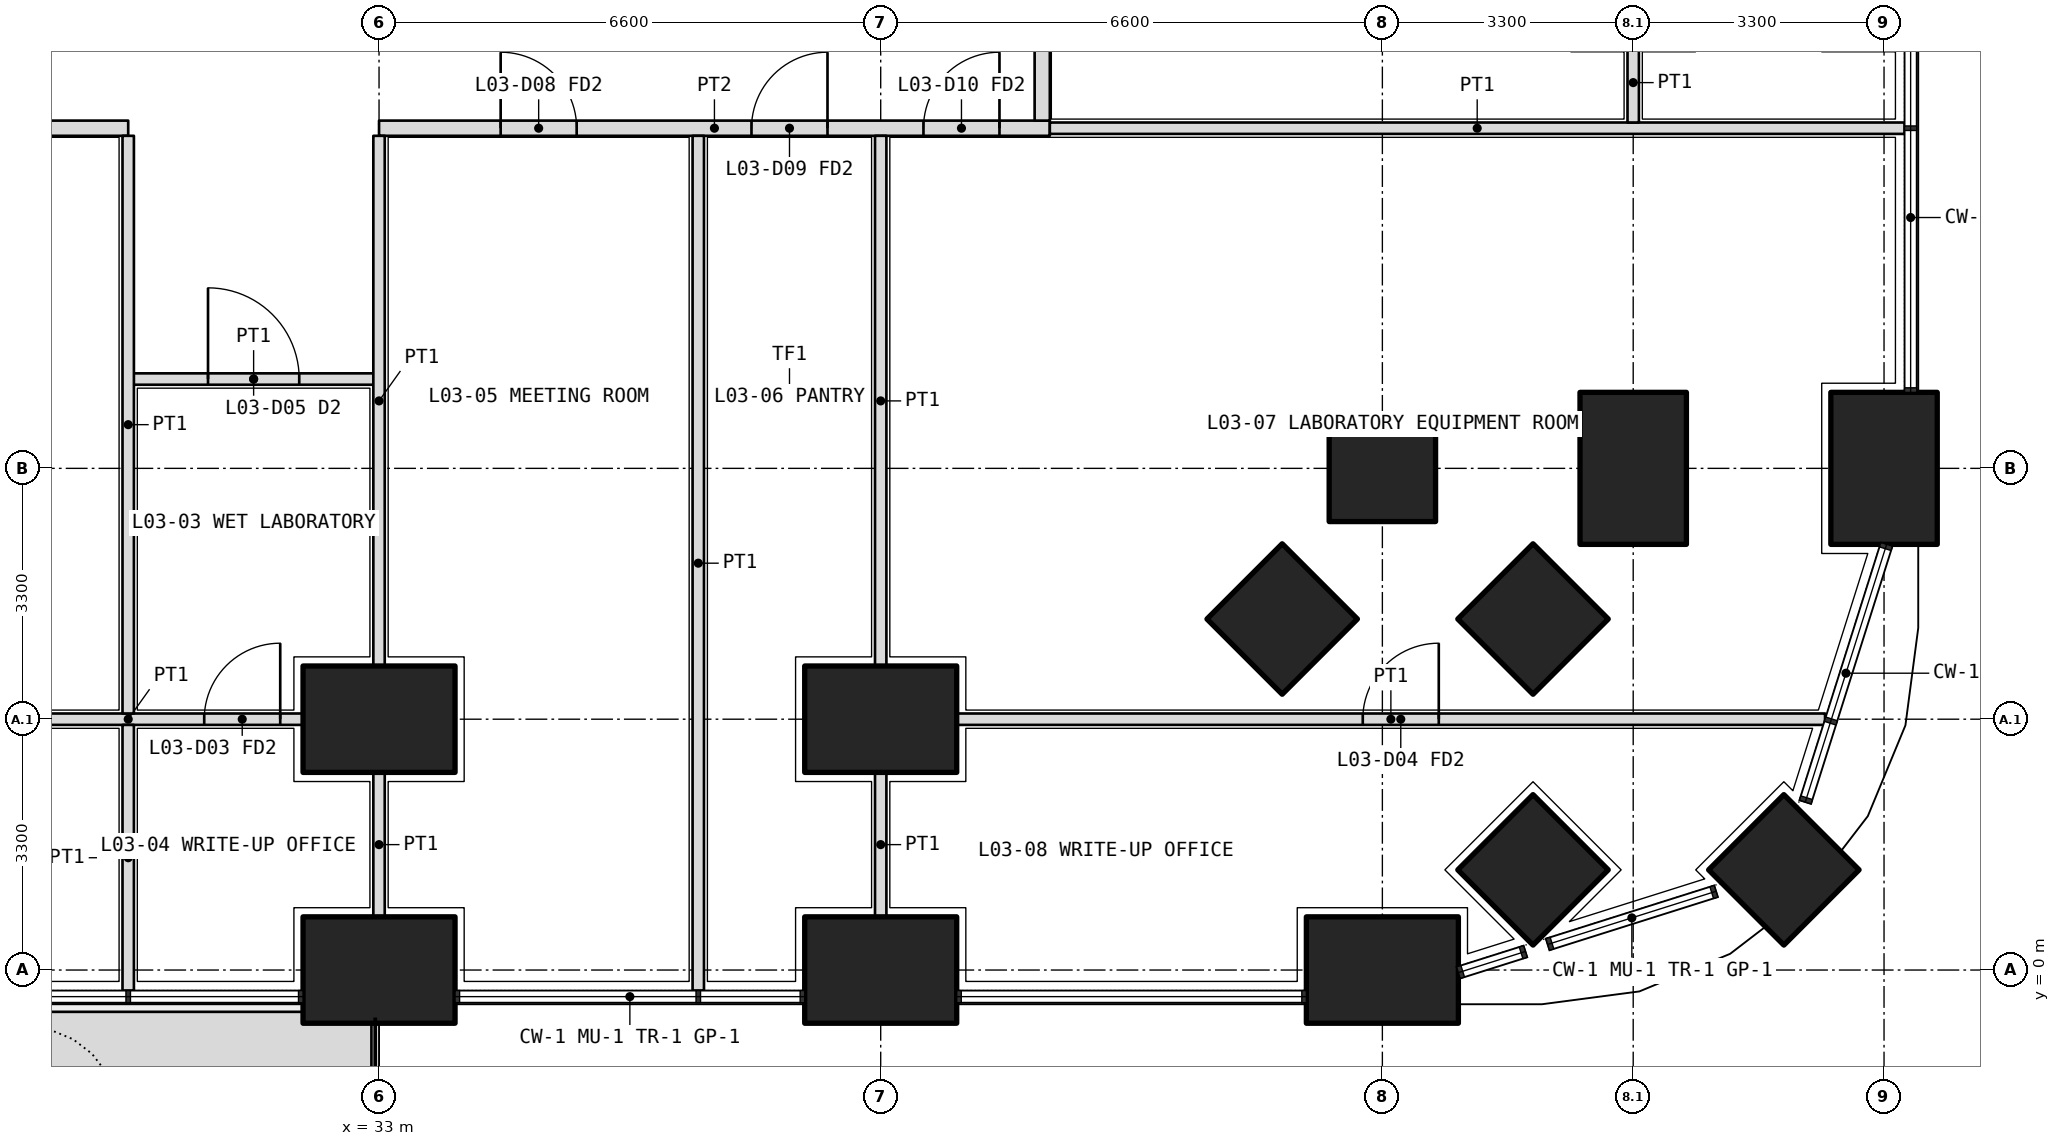
"""IFC4 building model, lengths in metres.
Left out: names, types, materials, properties, quantities, classifications, styles, units other than length and angle.
Written with IfcOpenShell. Run it as: python <this file> out.ifc"""

import sys

from ifc_helpers import new_model, si_unit, direction, frame, frame_2d, origin, origin_2d, place, context, subcontext, project, spatial, polyline, rectangle, outline, extrude, element, fill, save


model = new_model("IFC4")
c1 = context("Model", 3, precision=1e-05, world=origin(), true_north=direction((0.0, 1.0)))
c2 = subcontext(c1, "Body", "Model", "MODEL_VIEW")
j1 = project(units=[si_unit("LENGTHUNIT", "METRE"), si_unit("PLANEANGLEUNIT", "RADIAN")], contexts=[c1])
p1 = place(None, origin())
s1 = spatial("IfcSite", under=j1, at=p1, CompositionType="ELEMENT")
p2 = place(p1, origin())
s2 = spatial("IfcBuilding", under=s1, at=p2, CompositionType="ELEMENT")
p3 = place(p2, frame((0.0, 0.0, 17.1)))
s3 = spatial("IfcBuildingStorey", under=s2, at=p3, CompositionType="ELEMENT", Elevation=17.1)
p4 = place(p3, frame((51.482, 1.318, 0.0), z_axis=(0.0, 0.0, 1.0), x_axis=(0.707106781187, 0.707106781187, 0.0)))
e1 = element("IfcColumn", 1, at=p4, inside=s3, PredefinedType="COLUMN", context=c2, shape_type="SweptSolid", body=[
    extrude(rectangle(XDim=1.4, YDim=1.4, at=origin_2d()), origin(), (0.0, 0.0, 1.0), 4.2),
])
for number, where, z_axis, x_axis in (
    (2, (33.0, 0.0, 0.0), (0.0, 0.0, 1.0), (1.0, 0.0, 0.0)),
    (3, (39.6, 0.0, 0.0), (0.0, 0.0, 1.0), (1.0, 0.0, 0.0)),
    (4, (46.2, 0.0, 0.0), (0.0, 0.0, 1.0), (1.0, 0.0, 0.0)),
    (5, (52.8, 6.6, 0.0), (0.0, 0.0, 1.0), (0.0, 1.0, 0.0)),
):
    element("IfcColumn", number, at=place(p3, frame(where, z_axis=z_axis, x_axis=x_axis)), inside=s3, PredefinedType="COLUMN", context=c2, shape_type="SweptSolid", body=[
        extrude(rectangle(XDim=2.0, YDim=1.4, at=origin_2d()), origin(), (0.0, 0.0, 1.0), 4.2),
    ])
for number, where, z_axis, x_axis in (
    (6, (46.2, 6.6, 0.0), (0.0, 0.0, 1.0), (1.0, 0.0, 0.0)),
    (7, (48.182, 1.318, 0.0), (0.0, 0.0, 1.0), (0.707, 0.707, 0.0)),
):
    element("IfcColumn", number, at=place(p3, frame(where, z_axis=z_axis, x_axis=x_axis)), inside=s3, PredefinedType="COLUMN", context=c2, shape_type="SweptSolid", body=[
        extrude(rectangle(XDim=1.4, YDim=1.4, at=origin_2d()), origin(), (0.0, 0.0, 1.0), 4.2),
    ])
p5 = place(p3, frame((49.5, 6.6, 0.0), z_axis=(0.0, 0.0, 1.0), x_axis=(0.0, 1.0, 0.0)))
e8 = element("IfcColumn", 8, at=p5, inside=s3, PredefinedType="COLUMN", context=c2, shape_type="SweptSolid", body=[
    extrude(rectangle(XDim=2.0, YDim=1.4, at=origin_2d()), origin(), (0.0, 0.0, 1.0), 4.2),
])
p6 = place(p3, frame((48.182, 4.618, 0.0), z_axis=(0.0, 0.0, 1.0), x_axis=(0.707106781187, 0.707106781187, 0.0)))
e9 = element("IfcColumn", 9, at=p6, inside=s3, PredefinedType="COLUMN", context=c2, shape_type="SweptSolid", body=[
    extrude(rectangle(XDim=1.4, YDim=1.4, at=origin_2d()), origin(), (0.0, 0.0, 1.0), 4.2),
])
for number, where, z_axis, x_axis in (
    (10, (33.0, 3.3, 0.0), (0.0, 0.0, 1.0), (1.0, 0.0, 0.0)),
    (11, (39.6, 3.3, 0.0), (0.0, 0.0, 1.0), (1.0, 0.0, 0.0)),
):
    element("IfcColumn", number, at=place(p3, frame(where, z_axis=z_axis, x_axis=x_axis)), inside=s3, PredefinedType="COLUMN", context=c2, shape_type="SweptSolid", body=[
        extrude(rectangle(XDim=2.0, YDim=1.4, at=origin_2d()), origin(), (0.0, 0.0, 1.0), 4.2),
    ])
p7 = place(p3, frame((44.882, 4.618, 0.0), z_axis=(0.0, 0.0, 1.0), x_axis=(0.707106781187, 0.707106781187, 0.0)))
e12 = element("IfcColumn", 12, at=p7, inside=s3, PredefinedType="COLUMN", context=c2, shape_type="SweptSolid", body=[
    extrude(rectangle(XDim=1.4, YDim=1.4, at=origin_2d()), origin(), (0.0, 0.0, 1.0), 4.2),
])
p8 = place(p3, origin())
e13 = element("IfcWall", 13, at=p8, inside=s3, PredefinedType="USERDEFINED", context=c2, shape_type="SweptSolid", body=[
    extrude(outline(polyline([(23.85, -1.55), (32.9, -1.55), (32.9, -0.55), (23.85, -0.55), (23.85, -1.55)]), holes=[polyline([(24.0, -1.4), (32.75, -1.4), (32.75, -0.7), (24.0, -0.7), (24.0, -1.4)])]), origin(), (0.0, 0.0, 1.0), 1.05),
])
p9 = place(p3, frame((10.975, 11.075, 0.0), z_axis=(0.0, 0.0, 1.0), x_axis=(1.0, 0.0, 0.0)))
e14 = element("IfcWall", 14, at=p9, inside=s3, PredefinedType="PARTITIONING", context=c2, shape_type="SweptSolid", body=[
    extrude(rectangle(XDim=18.725, YDim=0.2, at=frame_2d((9.362, 0.0))), origin(), (0.0, 0.0, 1.0), 2.85),
])
p10 = place(p9, frame((8.913, 0.0, 0.0)))
e15 = element("IfcOpeningElement", 15, at=p10, cuts=e14, PredefinedType="OPENING", context=c2, shape_type="SweptSolid", body=[
    extrude(rectangle(XDim=1.0, YDim=2.1, at=frame_2d((0.5, 1.05))), frame((0.0, 0.11, 0.0), z_axis=(0.0, -1.0, 0.0), x_axis=(1.0, 0.0, 0.0)), (0.0, 0.0, 1.0), 0.22),
])
p11 = place(p3, frame((33.0, 11.075, 0.0), z_axis=(0.0, 0.0, 1.0), x_axis=(1.0, 0.0, 0.0)))
e16 = element("IfcWall", 16, at=p11, inside=s3, PredefinedType="PARTITIONING", context=c2, shape_type="SweptSolid", body=[
    extrude(rectangle(XDim=8.825, YDim=0.2, at=frame_2d((4.413, 0.0))), origin(), (0.0, 0.0, 1.0), 2.85),
])
p12 = place(p11, frame((1.6, 0.0, 0.0)))
e17 = element("IfcOpeningElement", 17, at=p12, cuts=e16, PredefinedType="OPENING", context=c2, shape_type="SweptSolid", body=[
    extrude(rectangle(XDim=1.0, YDim=2.1, at=frame_2d((0.5, 1.05))), frame((0.0, 0.11, 0.0), z_axis=(0.0, -1.0, 0.0), x_axis=(1.0, 0.0, 0.0)), (0.0, 0.0, 1.0), 0.22),
])
p13 = place(p11, frame((4.9, 0.0, 0.0)))
e18 = element("IfcOpeningElement", 18, at=p13, cuts=e16, PredefinedType="OPENING", context=c2, shape_type="SweptSolid", body=[
    extrude(rectangle(XDim=1.0, YDim=2.1, at=frame_2d((0.5, 1.05))), frame((0.0, 0.11, 0.0), z_axis=(0.0, -1.0, 0.0), x_axis=(1.0, 0.0, 0.0)), (0.0, 0.0, 1.0), 0.22),
])
p14 = place(p11, frame((7.163, 0.0, 0.0)))
e19 = element("IfcOpeningElement", 19, at=p14, cuts=e16, PredefinedType="OPENING", context=c2, shape_type="SweptSolid", body=[
    extrude(rectangle(XDim=1.0, YDim=2.1, at=frame_2d((0.5, 1.05))), frame((0.0, 0.11, 0.0), z_axis=(0.0, -1.0, 0.0), x_axis=(1.0, 0.0, 0.0)), (0.0, 0.0, 1.0), 0.22),
])
p15 = place(p3, frame((41.725, 11.175, 0.0), z_axis=(0.0, 0.0, 1.0), x_axis=(0.0, 1.0, 0.0)))
e20 = element("IfcWall", 20, at=p15, inside=s3, PredefinedType="PARTITIONING", context=c2, shape_type="SweptSolid", body=[
    extrude(rectangle(XDim=23.85, YDim=0.2, at=frame_2d((11.925, 0.0))), origin(), (0.0, 0.0, 1.0), 2.85),
])
p16 = place(p15, frame((3.762, 0.0, 0.0)))
e21 = element("IfcOpeningElement", 21, at=p16, cuts=e20, PredefinedType="OPENING", context=c2, shape_type="SweptSolid", body=[
    extrude(rectangle(XDim=1.0, YDim=2.1, at=frame_2d((0.5, 1.05))), frame((0.0, 0.11, 0.0), z_axis=(0.0, -1.0, 0.0), x_axis=(1.0, 0.0, 0.0)), (0.0, 0.0, 1.0), 0.22),
])
p17 = place(p15, frame((9.725, 0.0, 0.0)))
e22 = element("IfcOpeningElement", 22, at=p17, cuts=e20, PredefinedType="OPENING", context=c2, shape_type="SweptSolid", body=[
    extrude(rectangle(XDim=1.0, YDim=2.1, at=frame_2d((0.5, 1.05))), frame((0.0, 0.11, 0.0), z_axis=(0.0, -1.0, 0.0), x_axis=(1.0, 0.0, 0.0)), (0.0, 0.0, 1.0), 0.22),
])
p18 = place(p15, frame((13.075, 0.0, 0.0)))
e23 = element("IfcOpeningElement", 23, at=p18, cuts=e20, PredefinedType="OPENING", context=c2, shape_type="SweptSolid", body=[
    extrude(rectangle(XDim=0.9, YDim=2.1, at=frame_2d((0.45, 1.05))), frame((0.0, 0.11, 0.0), z_axis=(0.0, -1.0, 0.0), x_axis=(1.0, 0.0, 0.0)), (0.0, 0.0, 1.0), 0.22),
])
p19 = place(p15, frame((18.988, 0.0, 0.0)))
e24 = element("IfcOpeningElement", 24, at=p19, cuts=e20, PredefinedType="OPENING", context=c2, shape_type="SweptSolid", body=[
    extrude(rectangle(XDim=1.2, YDim=2.1, at=frame_2d((0.6, 1.05))), frame((0.0, 0.11, 0.0), z_axis=(0.0, -1.0, 0.0), x_axis=(1.0, 0.0, 0.0)), (0.0, 0.0, 1.0), 0.22),
])
p20 = place(p3, frame((53.07, 11.075, 0.0), z_axis=(0.0, 0.0, 1.0), x_axis=(-1.0, 0.0, 0.0)))
e25 = element("IfcWall", 25, at=p20, inside=s3, PredefinedType="PARTITIONING", context=c2, shape_type="SweptSolid", body=[
    extrude(rectangle(XDim=11.245, YDim=0.15, at=frame_2d((5.623, 0.0))), origin(), (0.0, 0.0, 1.0), 2.7),
])
p21 = place(p3, frame((27.4, 3.3, 0.0), z_axis=(0.0, 0.0, 1.0), x_axis=(1.0, 0.0, 0.0)))
e26 = element("IfcWall", 26, at=p21, inside=s3, PredefinedType="PARTITIONING", context=c2, shape_type="SweptSolid", body=[
    extrude(rectangle(XDim=4.6, YDim=0.15, at=frame_2d((2.3, 0.0))), origin(), (0.0, 0.0, 1.0), 3.9),
])
p22 = place(p21, frame((3.3, 0.0, 0.0)))
e27 = element("IfcOpeningElement", 27, at=p22, cuts=e26, PredefinedType="OPENING", context=c2, shape_type="SweptSolid", body=[
    extrude(rectangle(XDim=1.0, YDim=2.1, at=frame_2d((0.5, 1.05))), frame((0.0, 0.085, 0.0), z_axis=(0.0, -1.0, 0.0), x_axis=(1.0, 0.0, 0.0)), (0.0, 0.0, 1.0), 0.17),
])
p23 = place(p3, frame((40.6, 3.3, 0.0), z_axis=(0.0, 0.0, 1.0), x_axis=(1.0, 0.0, 0.0)))
e28 = element("IfcWall", 28, at=p23, inside=s3, PredefinedType="PARTITIONING", context=c2, shape_type="SweptSolid", body=[
    extrude(rectangle(XDim=11.424, YDim=0.15, at=frame_2d((5.712, 0.0))), origin(), (0.0, 0.0, 1.0), 2.7),
])
p24 = place(p23, frame((5.342, 0.0, 0.0)))
e29 = element("IfcOpeningElement", 29, at=p24, cuts=e28, PredefinedType="OPENING", context=c2, shape_type="SweptSolid", body=[
    extrude(rectangle(XDim=1.0, YDim=2.1, at=frame_2d((0.5, 1.05))), frame((0.0, 0.085, 0.0), z_axis=(0.0, -1.0, 0.0), x_axis=(1.0, 0.0, 0.0)), (0.0, 0.0, 1.0), 0.17),
])
p25 = place(p3, frame((29.7, 7.775, 0.0), z_axis=(0.0, 0.0, 1.0), x_axis=(1.0, 0.0, 0.0)))
e30 = element("IfcWall", 30, at=p25, inside=s3, PredefinedType="PARTITIONING", context=c2, shape_type="SweptSolid", body=[
    extrude(rectangle(XDim=3.3, YDim=0.15, at=frame_2d((1.65, 0.0))), origin(), (0.0, 0.0, 1.0), 2.85),
])
p26 = place(p25, frame((1.05, 0.0, 0.0)))
e31 = element("IfcOpeningElement", 31, at=p26, cuts=e30, PredefinedType="OPENING", context=c2, shape_type="SweptSolid", body=[
    extrude(rectangle(XDim=1.2, YDim=2.1, at=frame_2d((0.6, 1.05))), frame((0.0, 0.085, 0.0), z_axis=(0.0, -1.0, 0.0), x_axis=(1.0, 0.0, 0.0)), (0.0, 0.0, 1.0), 0.17),
])
p27 = place(p3, frame((37.2, -0.27, 0.0), z_axis=(0.0, 0.0, 1.0), x_axis=(0.0, 1.0, 0.0)))
e32 = element("IfcWall", 32, at=p27, inside=s3, PredefinedType="PARTITIONING", context=c2, shape_type="SweptSolid", body=[
    extrude(rectangle(XDim=11.245, YDim=0.15, at=frame_2d((5.623, 0.0))), origin(), (0.0, 0.0, 1.0), 2.7),
])
p28 = place(p3, frame((39.6, 0.7, 0.0), z_axis=(0.0, 0.0, 1.0), x_axis=(0.0, 1.0, 0.0)))
e33 = element("IfcWall", 33, at=p28, inside=s3, PredefinedType="PARTITIONING", context=c2, shape_type="SweptSolid", body=[
    extrude(rectangle(XDim=1.9, YDim=0.15, at=frame_2d((0.95, 0.0))), origin(), (0.0, 0.0, 1.0), 2.85),
])
p29 = place(p3, frame((39.6, 4.0, 0.0), z_axis=(0.0, 0.0, 1.0), x_axis=(0.0, 1.0, 0.0)))
e34 = element("IfcWall", 34, at=p29, inside=s3, PredefinedType="PARTITIONING", context=c2, shape_type="SweptSolid", body=[
    extrude(rectangle(XDim=6.975, YDim=0.15, at=frame_2d((3.488, 0.0))), origin(), (0.0, 0.0, 1.0), 2.85),
])
p30 = place(p3, frame((29.7, -0.27, 0.0), z_axis=(0.0, 0.0, 1.0), x_axis=(0.0, 1.0, 0.0)))
e35 = element("IfcWall", 35, at=p30, inside=s3, PredefinedType="PARTITIONING", context=c2, shape_type="SweptSolid", body=[
    extrude(rectangle(XDim=3.495, YDim=0.15, at=frame_2d((1.748, 0.0))), origin(), (0.0, 0.0, 1.0), 2.7),
])
p31 = place(p3, frame((29.7, 3.375, 0.0), z_axis=(0.0, 0.0, 1.0), x_axis=(0.0, 1.0, 0.0)))
e36 = element("IfcWall", 36, at=p31, inside=s3, PredefinedType="PARTITIONING", context=c2, shape_type="SweptSolid", body=[
    extrude(rectangle(XDim=7.6, YDim=0.15, at=frame_2d((3.8, 0.0))), origin(), (0.0, 0.0, 1.0), 3.9),
])
p32 = place(p3, frame((33.0, 0.7, 0.0), z_axis=(0.0, 0.0, 1.0), x_axis=(0.0, 1.0, 0.0)))
e37 = element("IfcWall", 37, at=p32, inside=s3, PredefinedType="PARTITIONING", context=c2, shape_type="SweptSolid", body=[
    extrude(rectangle(XDim=1.9, YDim=0.15, at=frame_2d((0.95, 0.0))), origin(), (0.0, 0.0, 1.0), 2.85),
])
p33 = place(p3, frame((33.0, 4.0, 0.0), z_axis=(0.0, 0.0, 1.0), x_axis=(0.0, 1.0, 0.0)))
e38 = element("IfcWall", 38, at=p33, inside=s3, PredefinedType="PARTITIONING", context=c2, shape_type="SweptSolid", body=[
    extrude(rectangle(XDim=6.975, YDim=0.15, at=frame_2d((3.488, 0.0))), origin(), (0.0, 0.0, 1.0), 2.85),
])
p34 = place(p3, frame((49.5, 11.15, 0.0), z_axis=(0.0, 0.0, 1.0), x_axis=(0.0, 1.0, 0.0)))
e39 = element("IfcWall", 39, at=p34, inside=s3, PredefinedType="PARTITIONING", context=c2, shape_type="SweptSolid", body=[
    extrude(rectangle(XDim=1.05, YDim=0.15, at=frame_2d((0.525, 0.0))), origin(), (0.0, 0.0, 1.0), 3.9),
])
p35 = place(p26, origin())
e40 = element("IfcDoor", 40, at=p35, inside=s3, OperationType="DOUBLE_DOOR_SINGLE_SWING", PredefinedType="DOOR", context=c2, shape_type="SweptSolid", body=[
    extrude(rectangle(XDim=1.2, YDim=2.1, at=frame_2d((0.6, 1.05))), frame((0.0, 0.025, 0.0), z_axis=(0.0, -1.0, 0.0), x_axis=(1.0, 0.0, 0.0)), (0.0, 0.0, 1.0), 0.05),
])
fill(e31, e40)
p36 = place(p22, origin())
e41 = element("IfcDoor", 41, at=p36, inside=s3, OperationType="SINGLE_SWING_RIGHT", PredefinedType="DOOR", context=c2, shape_type="SweptSolid", body=[
    extrude(rectangle(XDim=1.0, YDim=2.1, at=frame_2d((0.5, 1.05))), frame((0.0, 0.025, 0.0), z_axis=(0.0, -1.0, 0.0), x_axis=(1.0, 0.0, 0.0)), (0.0, 0.0, 1.0), 0.05),
])
fill(e27, e41)
p37 = place(p12, origin())
e42 = element("IfcDoor", 42, at=p37, inside=s3, OperationType="SINGLE_SWING_LEFT", PredefinedType="DOOR", context=c2, shape_type="SweptSolid", body=[
    extrude(rectangle(XDim=1.0, YDim=2.1, at=frame_2d((0.5, 1.05))), frame((0.0, 0.025, 0.0), z_axis=(0.0, -1.0, 0.0), x_axis=(1.0, 0.0, 0.0)), (0.0, 0.0, 1.0), 0.05),
])
fill(e17, e42)
p38 = place(p13, origin())
e43 = element("IfcDoor", 43, at=p38, inside=s3, OperationType="SINGLE_SWING_RIGHT", PredefinedType="DOOR", context=c2, shape_type="SweptSolid", body=[
    extrude(rectangle(XDim=1.0, YDim=2.1, at=frame_2d((0.5, 1.05))), frame((0.0, 0.025, 0.0), z_axis=(0.0, -1.0, 0.0), x_axis=(1.0, 0.0, 0.0)), (0.0, 0.0, 1.0), 0.05),
])
fill(e18, e43)
p39 = place(p14, origin())
e44 = element("IfcDoor", 44, at=p39, inside=s3, OperationType="SINGLE_SWING_RIGHT", PredefinedType="DOOR", context=c2, shape_type="SweptSolid", body=[
    extrude(rectangle(XDim=1.0, YDim=2.1, at=frame_2d((0.5, 1.05))), frame((0.0, 0.025, 0.0), z_axis=(0.0, -1.0, 0.0), x_axis=(1.0, 0.0, 0.0)), (0.0, 0.0, 1.0), 0.05),
])
fill(e19, e44)
p40 = place(p24, origin())
e45 = element("IfcDoor", 45, at=p40, inside=s3, OperationType="SINGLE_SWING_RIGHT", PredefinedType="DOOR", context=c2, shape_type="SweptSolid", body=[
    extrude(rectangle(XDim=1.0, YDim=2.1, at=frame_2d((0.5, 1.05))), frame((0.0, 0.025, 0.0), z_axis=(0.0, -1.0, 0.0), x_axis=(1.0, 0.0, 0.0)), (0.0, 0.0, 1.0), 0.05),
])
fill(e29, e45)
save(model, sys.argv[1])
